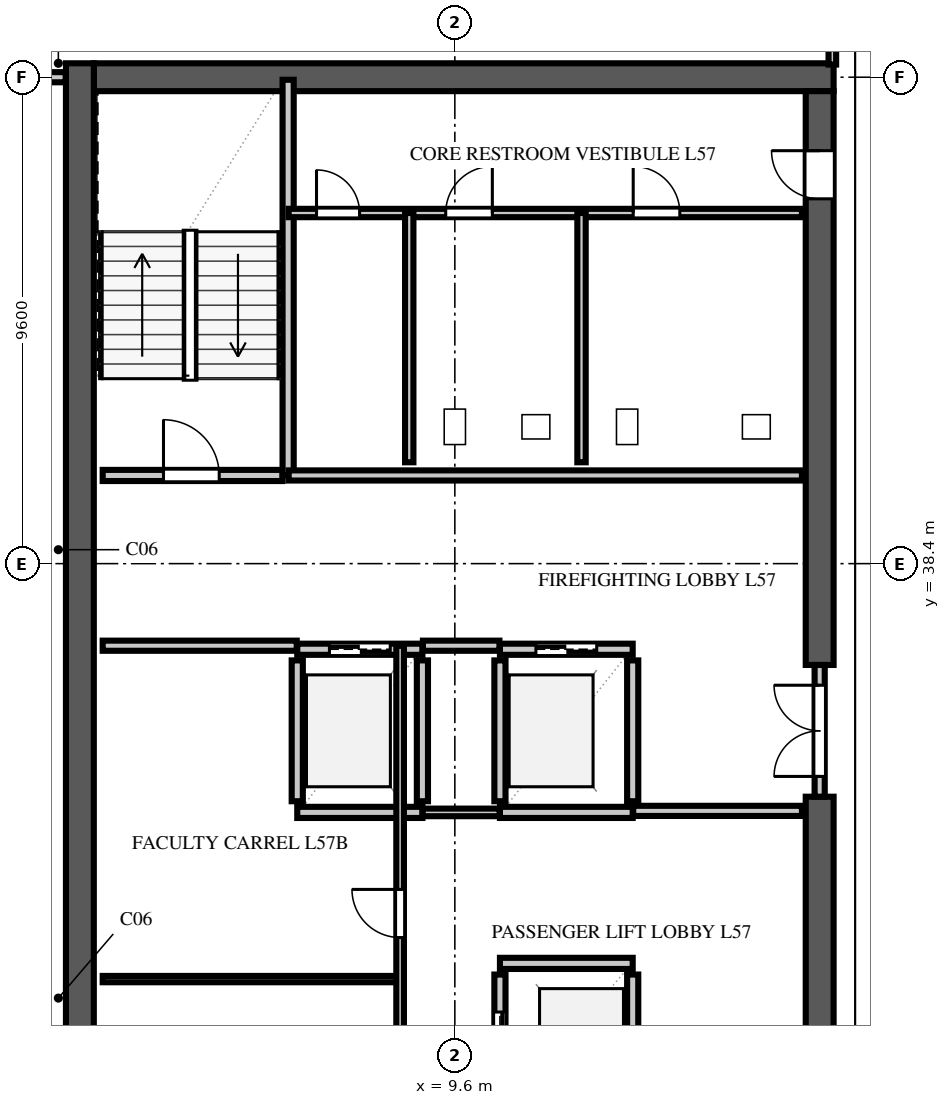
"""IFC4 building model, lengths in metres.
Left out: names, types, materials, properties, quantities, classifications, styles, units other than length and angle.
Written with IfcOpenShell. Run it as: python <this file> out.ifc"""

import sys

from ifc_helpers import new_model, si_unit, direction, frame, frame_2d, origin, place, context, subcontext, project, spatial, rectangle, extrude, element, fill, save


model = new_model("IFC4")
c1 = context("Model", 3, precision=1e-05, world=origin(), true_north=direction((0.0, 1.0)))
c2 = subcontext(c1, "Body", "Model", "MODEL_VIEW")
j1 = project(units=[si_unit("LENGTHUNIT", "METRE"), si_unit("PLANEANGLEUNIT", "RADIAN")], contexts=[c1])
p1 = place(None, origin())
s1 = spatial("IfcSite", under=j1, at=p1, CompositionType="ELEMENT")
p2 = place(p1, origin())
s2 = spatial("IfcBuilding", under=s1, at=p2, CompositionType="ELEMENT")
p3 = place(p2, frame((0.0, 0.0, 225.6)))
s3 = spatial("IfcBuildingStorey", under=s2, at=p3, CompositionType="ELEMENT", Elevation=225.6)
p4 = place(p3, frame((2.475, 48.0, 0.0), z_axis=(0.0, 0.0, 1.0), x_axis=(1.0, 0.0, 0.0)))
e1 = element("IfcWall", 1, at=p4, inside=s3, PredefinedType="SHEAR", context=c2, shape_type="SweptSolid", body=[
    extrude(rectangle(XDim=14.6, YDim=0.55, at=frame_2d((7.3, 0.0))), origin(), (0.0, 0.0, 1.0), 3.54),
])
p5 = place(p3, frame((2.2, 9.325, 0.0), z_axis=(0.0, 0.0, 1.0), x_axis=(0.0, 1.0, 0.0)))
e2 = element("IfcWall", 2, at=p5, inside=s3, PredefinedType="SHEAR", context=c2, shape_type="SweptSolid", body=[
    extrude(rectangle(XDim=38.95, YDim=0.55, at=frame_2d((19.475, 0.0))), origin(), (0.0, 0.0, 1.0), 3.54),
])
p6 = place(p3, frame((16.8, 26.0, 0.0), z_axis=(0.0, 0.0, 1.0), x_axis=(0.0, 1.0, 0.0)))
e3 = element("IfcWall", 3, at=p6, inside=s3, PredefinedType="SHEAR", context=c2, shape_type="SweptSolid", body=[
    extrude(rectangle(XDim=7.8, YDim=0.55, at=frame_2d((3.9, 0.0))), origin(), (0.0, 0.0, 1.0), 3.54),
])
p7 = place(p3, frame((16.8, 36.4, 0.0), z_axis=(0.0, 0.0, 1.0), x_axis=(0.0, 1.0, 0.0)))
e4 = element("IfcWall", 4, at=p7, inside=s3, PredefinedType="SHEAR", context=c2, shape_type="SweptSolid", body=[
    extrude(rectangle(XDim=11.325, YDim=0.55, at=frame_2d((5.663, 0.0))), origin(), (0.0, 0.0, 1.0), 3.54),
])
p8 = place(p7, frame((9.2, 0.0, 0.0)))
e5 = element("IfcOpeningElement", 5, at=p8, cuts=e4, PredefinedType="OPENING", context=c2, shape_type="SweptSolid", body=[
    extrude(rectangle(XDim=0.95, YDim=2.15, at=frame_2d((0.475, 1.075))), frame((0.0, 0.287, 0.0), z_axis=(0.0, -1.0, 0.0), x_axis=(1.0, 0.0, 0.0)), (0.0, 0.0, 1.0), 0.574),
])
p9 = place(p3, frame((2.65, 40.14, 0.0), z_axis=(0.0, 0.0, 1.0), x_axis=(1.0, 0.0, 0.0)))
e6 = element("IfcWall", 6, at=p9, inside=s3, PredefinedType="SOLIDWALL", context=c2, shape_type="SweptSolid", body=[
    extrude(rectangle(XDim=3.55, YDim=0.22, at=frame_2d((1.775, 0.0))), origin(), (0.0, 0.0, 1.0), 3.54),
])
p10 = place(p9, frame((1.2, 0.0, 0.0)))
e7 = element("IfcOpeningElement", 7, at=p10, cuts=e6, PredefinedType="OPENING", context=c2, shape_type="SweptSolid", body=[
    extrude(rectangle(XDim=1.1, YDim=2.2, at=frame_2d((0.55, 1.1))), frame((0.0, 0.122, 0.0), z_axis=(0.0, -1.0, 0.0), x_axis=(1.0, 0.0, 0.0)), (0.0, 0.0, 1.0), 0.244),
])
p11 = place(p3, frame((6.31, 40.14, 0.0), z_axis=(0.0, 0.0, 1.0), x_axis=(0.0, 1.0, 0.0)))
e8 = element("IfcWall", 8, at=p11, inside=s3, PredefinedType="SOLIDWALL", context=c2, shape_type="SweptSolid", body=[
    extrude(rectangle(XDim=7.81, YDim=0.22, at=frame_2d((3.905, 0.0))), origin(), (0.0, 0.0, 1.0), 3.54),
])
p12 = place(p3, frame((10.49, 27.71, 0.0), z_axis=(0.0, 0.0, 1.0), x_axis=(0.0, 1.0, 0.0)))
e9 = element("IfcWall", 9, at=p12, inside=s3, PredefinedType="SOLIDWALL", context=c2, shape_type="SweptSolid", body=[
    extrude(rectangle(XDim=2.58, YDim=0.22, at=frame_2d((1.29, 0.0))), origin(), (0.0, 0.0, 1.0), 3.54),
])
p13 = place(p12, frame((0.74, 0.0, 0.0)))
e10 = element("IfcOpeningElement", 10, at=p13, cuts=e9, PredefinedType="OPENING", context=c2, shape_type="SweptSolid", body=[
    extrude(rectangle(XDim=1.1, YDim=2.2, at=frame_2d((0.55, 1.1))), frame((0.0, 0.122, 0.0), z_axis=(0.0, -1.0, 0.0), x_axis=(1.0, 0.0, 0.0)), (0.0, 0.0, 1.0), 0.244),
])
p14 = place(p3, frame((13.11, 27.71, 0.0), z_axis=(0.0, 0.0, 1.0), x_axis=(0.0, 1.0, 0.0)))
e11 = element("IfcWall", 11, at=p14, inside=s3, PredefinedType="SOLIDWALL", context=c2, shape_type="SweptSolid", body=[
    extrude(rectangle(XDim=2.58, YDim=0.22, at=frame_2d((1.29, 0.0))), origin(), (0.0, 0.0, 1.0), 3.54),
])
p15 = place(p3, frame((10.49, 30.51, 0.0), z_axis=(0.0, 0.0, 1.0), x_axis=(1.0, 0.0, 0.0)))
e12 = element("IfcWall", 12, at=p15, inside=s3, PredefinedType="SOLIDWALL", context=c2, shape_type="SweptSolid", body=[
    extrude(rectangle(XDim=2.62, YDim=0.22, at=frame_2d((1.31, 0.0))), origin(), (0.0, 0.0, 1.0), 3.54),
])
for number, where, z_axis, x_axis in (
    (13, (6.49, 33.71, 0.0), (0.0, 0.0, 1.0), (0.0, 1.0, 0.0)),
    (14, (8.96, 33.71, 0.0), (0.0, 0.0, 1.0), (0.0, 1.0, 0.0)),
):
    element("IfcWall", number, at=place(p3, frame(where, z_axis=z_axis, x_axis=x_axis)), inside=s3, PredefinedType="SOLIDWALL", context=c2, shape_type="SweptSolid", body=[
        extrude(rectangle(XDim=2.78, YDim=0.22, at=frame_2d((1.39, 0.0))), origin(), (0.0, 0.0, 1.0), 3.54),
    ])
p16 = place(p3, frame((6.49, 33.49, 0.0), z_axis=(0.0, 0.0, 1.0), x_axis=(1.0, 0.0, 0.0)))
e15 = element("IfcWall", 15, at=p16, inside=s3, PredefinedType="SOLIDWALL", context=c2, shape_type="SweptSolid", body=[
    extrude(rectangle(XDim=2.47, YDim=0.22, at=frame_2d((1.235, 0.0))), origin(), (0.0, 0.0, 1.0), 3.54),
])
p17 = place(p3, frame((6.49, 36.71, 0.0), z_axis=(0.0, 0.0, 1.0), x_axis=(1.0, 0.0, 0.0)))
e16 = element("IfcWall", 16, at=p17, inside=s3, PredefinedType="SOLIDWALL", context=c2, shape_type="SweptSolid", body=[
    extrude(rectangle(XDim=2.47, YDim=0.22, at=frame_2d((1.235, 0.0))), origin(), (0.0, 0.0, 1.0), 3.54),
])
p18 = place(p17, frame((0.635, 0.0, 0.0)))
e17 = element("IfcOpeningElement", 17, at=p18, cuts=e16, PredefinedType="OPENING", context=c2, shape_type="SweptSolid", body=[
    extrude(rectangle(XDim=1.2, YDim=2.2, at=frame_2d((0.6, 1.1))), frame((0.0, 0.122, 0.0), z_axis=(0.0, -1.0, 0.0), x_axis=(1.0, 0.0, 0.0)), (0.0, 0.0, 1.0), 0.244),
])
for number, where, z_axis, x_axis in (
    (18, (10.49, 33.71, 0.0), (0.0, 0.0, 1.0), (0.0, 1.0, 0.0)),
    (19, (13.11, 33.71, 0.0), (0.0, 0.0, 1.0), (0.0, 1.0, 0.0)),
):
    element("IfcWall", number, at=place(p3, frame(where, z_axis=z_axis, x_axis=x_axis)), inside=s3, PredefinedType="SOLIDWALL", context=c2, shape_type="SweptSolid", body=[
        extrude(rectangle(XDim=2.78, YDim=0.22, at=frame_2d((1.39, 0.0))), origin(), (0.0, 0.0, 1.0), 3.54),
    ])
p19 = place(p3, frame((10.49, 33.49, 0.0), z_axis=(0.0, 0.0, 1.0), x_axis=(1.0, 0.0, 0.0)))
e20 = element("IfcWall", 20, at=p19, inside=s3, PredefinedType="SOLIDWALL", context=c2, shape_type="SweptSolid", body=[
    extrude(rectangle(XDim=2.62, YDim=0.22, at=frame_2d((1.31, 0.0))), origin(), (0.0, 0.0, 1.0), 3.54),
])
p20 = place(p3, frame((10.49, 36.71, 0.0), z_axis=(0.0, 0.0, 1.0), x_axis=(1.0, 0.0, 0.0)))
e21 = element("IfcWall", 21, at=p20, inside=s3, PredefinedType="SOLIDWALL", context=c2, shape_type="SweptSolid", body=[
    extrude(rectangle(XDim=2.62, YDim=0.22, at=frame_2d((1.31, 0.0))), origin(), (0.0, 0.0, 1.0), 3.54),
])
p21 = place(p20, frame((0.71, 0.0, 0.0)))
e22 = element("IfcOpeningElement", 22, at=p21, cuts=e21, PredefinedType="OPENING", context=c2, shape_type="SweptSolid", body=[
    extrude(rectangle(XDim=1.2, YDim=2.2, at=frame_2d((0.6, 1.1))), frame((0.0, 0.122, 0.0), z_axis=(0.0, -1.0, 0.0), x_axis=(1.0, 0.0, 0.0)), (0.0, 0.0, 1.0), 0.244),
])
p22 = place(p3, frame((2.65, 36.78, 0.0), z_axis=(0.0, 0.0, 1.0), x_axis=(1.0, 0.0, 0.0)))
e23 = element("IfcWall", 23, at=p22, inside=s3, PredefinedType="SOLIDWALL", context=c2, shape_type="SweptSolid", body=[
    extrude(rectangle(XDim=3.83, YDim=0.2, at=frame_2d((1.915, 0.0))), origin(), (0.0, 0.0, 1.0), 3.54),
])
p23 = place(p3, frame((8.97, 36.78, 0.0), z_axis=(0.0, 0.0, 1.0), x_axis=(1.0, 0.0, 0.0)))
e24 = element("IfcWall", 24, at=p23, inside=s3, PredefinedType="SOLIDWALL", context=c2, shape_type="SweptSolid", body=[
    extrude(rectangle(XDim=1.51, YDim=0.2, at=frame_2d((0.755, 0.0))), origin(), (0.0, 0.0, 1.0), 3.54),
])
p24 = place(p3, frame((13.12, 33.52, 0.0), z_axis=(0.0, 0.0, 1.0), x_axis=(1.0, 0.0, 0.0)))
e25 = element("IfcWall", 25, at=p24, inside=s3, PredefinedType="SOLIDWALL", context=c2, shape_type="SweptSolid", body=[
    extrude(rectangle(XDim=3.33, YDim=0.2, at=frame_2d((1.665, 0.0))), origin(), (0.0, 0.0, 1.0), 3.54),
])
p25 = place(p3, frame((6.32, 40.14, 0.0), z_axis=(0.0, 0.0, 1.0), x_axis=(1.0, 0.0, 0.0)))
e26 = element("IfcWall", 26, at=p25, inside=s3, PredefinedType="SOLIDWALL", context=c2, shape_type="SweptSolid", body=[
    extrude(rectangle(XDim=10.13, YDim=0.2, at=frame_2d((5.065, 0.0))), origin(), (0.0, 0.0, 1.0), 3.54),
])
p26 = place(p3, frame((16.8, 33.8, 0.0), z_axis=(0.0, 0.0, 1.0), x_axis=(0.0, 1.0, 0.0)))
e27 = element("IfcWall", 27, at=p26, inside=s3, PredefinedType="SOLIDWALL", context=c2, shape_type="SweptSolid", body=[
    extrude(rectangle(XDim=2.6, YDim=0.2, at=frame_2d((1.3, 0.0))), origin(), (0.0, 0.0, 1.0), 3.54),
])
p27 = place(p26, frame((0.4, 0.0, 0.0)))
e28 = element("IfcOpeningElement", 28, at=p27, cuts=e27, PredefinedType="OPENING", context=c2, shape_type="SweptSolid", body=[
    extrude(rectangle(XDim=1.8, YDim=2.2, at=frame_2d((0.9, 1.1))), frame((0.0, 0.112, 0.0), z_axis=(0.0, -1.0, 0.0), x_axis=(1.0, 0.0, 0.0)), (0.0, 0.0, 1.0), 0.224),
])
p28 = place(p3, frame((8.965, 33.49, 0.0), z_axis=(0.0, 0.0, 1.0), x_axis=(1.0, 0.0, 0.0)))
e29 = element("IfcWall", 29, at=p28, inside=s3, PredefinedType="PARTITIONING", context=c2, shape_type="SweptSolid", body=[
    extrude(rectangle(XDim=1.52, YDim=0.15, at=frame_2d((0.76, 0.0))), origin(), (0.0, 0.0, 1.0), 3.54),
])
p29 = place(p3, frame((2.65, 30.2, 0.0), z_axis=(0.0, 0.0, 1.0), x_axis=(1.0, 0.0, 0.0)))
e30 = element("IfcWall", 30, at=p29, inside=s3, PredefinedType="PARTITIONING", context=c2, shape_type="SweptSolid", body=[
    extrude(rectangle(XDim=5.87, YDim=0.125, at=frame_2d((2.935, 0.0))), origin(), (0.0, 0.0, 1.0), 3.54),
])
p30 = place(p3, frame((8.52, 12.02, 0.0), z_axis=(0.0, 0.0, 1.0), x_axis=(0.0, 1.0, 0.0)))
e31 = element("IfcWall", 31, at=p30, inside=s3, PredefinedType="PARTITIONING", context=c2, shape_type="SweptSolid", body=[
    extrude(rectangle(XDim=24.76, YDim=0.15, at=frame_2d((12.38, 0.0))), origin(), (0.0, 0.0, 1.0), 3.54),
])
p31 = place(p30, frame((8.0, 0.0, 0.0)))
e32 = element("IfcOpeningElement", 32, at=p31, cuts=e31, PredefinedType="OPENING", context=c2, shape_type="SweptSolid", body=[
    extrude(rectangle(XDim=0.95, YDim=2.15, at=frame_2d((0.475, 1.075))), frame((0.0, 0.087, 0.0), z_axis=(0.0, -1.0, 0.0), x_axis=(1.0, 0.0, 0.0)), (0.0, 0.0, 1.0), 0.174),
])
p32 = place(p30, frame((19.0, 0.0, 0.0)))
e33 = element("IfcOpeningElement", 33, at=p32, cuts=e31, PredefinedType="OPENING", context=c2, shape_type="SweptSolid", body=[
    extrude(rectangle(XDim=0.95, YDim=2.15, at=frame_2d((0.475, 1.075))), frame((0.0, 0.087, 0.0), z_axis=(0.0, -1.0, 0.0), x_axis=(1.0, 0.0, 0.0)), (0.0, 0.0, 1.0), 0.174),
])
p33 = place(p3, frame((6.32, 45.32, 0.0), z_axis=(0.0, 0.0, 1.0), x_axis=(1.0, 0.0, 0.0)))
e34 = element("IfcWall", 34, at=p33, inside=s3, PredefinedType="PLUMBINGWALL", context=c2, shape_type="SweptSolid", body=[
    extrude(rectangle(XDim=10.13, YDim=0.165, at=frame_2d((5.065, 0.0))), origin(), (0.0, 0.0, 1.0), 3.54),
])
p34 = place(p33, frame((0.55, 0.0, 0.0)))
e35 = element("IfcOpeningElement", 35, at=p34, cuts=e34, PredefinedType="OPENING", context=c2, shape_type="SweptSolid", body=[
    extrude(rectangle(XDim=0.85, YDim=2.1, at=frame_2d((0.425, 1.05))), frame((0.0, 0.094, 0.0), z_axis=(0.0, -1.0, 0.0), x_axis=(1.0, 0.0, 0.0)), (0.0, 0.0, 1.0), 0.189),
])
p35 = place(p33, frame((3.1, 0.0, 0.0)))
e36 = element("IfcOpeningElement", 36, at=p35, cuts=e34, PredefinedType="OPENING", context=c2, shape_type="SweptSolid", body=[
    extrude(rectangle(XDim=0.92, YDim=2.15, at=frame_2d((0.46, 1.075))), frame((0.0, 0.094, 0.0), z_axis=(0.0, -1.0, 0.0), x_axis=(1.0, 0.0, 0.0)), (0.0, 0.0, 1.0), 0.189),
])
p36 = place(p33, frame((6.8, 0.0, 0.0)))
e37 = element("IfcOpeningElement", 37, at=p36, cuts=e34, PredefinedType="OPENING", context=c2, shape_type="SweptSolid", body=[
    extrude(rectangle(XDim=0.92, YDim=2.15, at=frame_2d((0.46, 1.075))), frame((0.0, 0.094, 0.0), z_axis=(0.0, -1.0, 0.0), x_axis=(1.0, 0.0, 0.0)), (0.0, 0.0, 1.0), 0.189),
])
for number, where, z_axis, x_axis in (
    (38, (8.7, 40.4, 0.0), (0.0, 0.0, 1.0), (0.0, 1.0, 0.0)),
    (39, (12.1, 40.4, 0.0), (0.0, 0.0, 1.0), (0.0, 1.0, 0.0)),
):
    element("IfcWall", number, at=place(p3, frame(where, z_axis=z_axis, x_axis=x_axis)), inside=s3, PredefinedType="PLUMBINGWALL", context=c2, shape_type="SweptSolid", body=[
        extrude(rectangle(XDim=4.92, YDim=0.165, at=frame_2d((2.46, 0.0))), origin(), (0.0, 0.0, 1.0), 3.54),
    ])
p37 = place(p3, frame((0.85, 48.0, 0.0), z_axis=(0.0, 0.0, 1.0), x_axis=(1.0, 0.0, 0.0)))
e40 = element("IfcWall", 40, at=p37, inside=s3, PredefinedType="SOLIDWALL", context=c2, shape_type="SweptSolid", body=[
    extrude(rectangle(XDim=1.07, YDim=0.2, at=frame_2d((0.535, 0.0))), origin(), (0.0, 0.0, 1.0), 3.54),
])
p38 = place(p3, frame((17.05, 48.25, 0.0), z_axis=(0.0, 0.0, 1.0), x_axis=(0.0, 1.0, 0.0)))
e41 = element("IfcWall", 41, at=p38, inside=s3, PredefinedType="PARTITIONING", context=c2, shape_type="SweptSolid", body=[
    extrude(rectangle(XDim=9.13, YDim=0.15, at=frame_2d((4.565, 0.0))), origin(), (0.0, 0.0, 1.0), 3.54),
])
p39 = place(p38, frame((2.9, 0.0, 0.0)))
e42 = element("IfcOpeningElement", 42, at=p39, cuts=e41, PredefinedType="OPENING", context=c2, shape_type="SweptSolid", body=[
    extrude(rectangle(XDim=0.95, YDim=2.15, at=frame_2d((0.475, 1.075))), frame((0.0, 0.087, 0.0), z_axis=(0.0, -1.0, 0.0), x_axis=(1.0, 0.0, 0.0)), (0.0, 0.0, 1.0), 0.174),
])
p40 = place(p10, origin())
e43 = element("IfcDoor", 43, at=p40, inside=s3, OperationType="SINGLE_SWING_LEFT", PredefinedType="DOOR", context=c2, shape_type="SweptSolid", body=[
    extrude(rectangle(XDim=1.1, YDim=2.2, at=frame_2d((0.55, 1.1))), frame((0.0, 0.025, 0.0), z_axis=(0.0, -1.0, 0.0), x_axis=(1.0, 0.0, 0.0)), (0.0, 0.0, 1.0), 0.05),
])
fill(e7, e43)
p41 = place(p13, origin())
e44 = element("IfcDoor", 44, at=p41, inside=s3, OperationType="DOUBLE_DOOR_SLIDING", PredefinedType="DOOR", context=c2, shape_type="SweptSolid", body=[
    extrude(rectangle(XDim=1.1, YDim=2.2, at=frame_2d((0.55, 1.1))), frame((0.0, 0.025, 0.0), z_axis=(0.0, -1.0, 0.0), x_axis=(1.0, 0.0, 0.0)), (0.0, 0.0, 1.0), 0.05),
])
fill(e10, e44)
p42 = place(p18, origin())
e45 = element("IfcDoor", 45, at=p42, inside=s3, OperationType="DOUBLE_DOOR_SLIDING", PredefinedType="DOOR", context=c2, shape_type="SweptSolid", body=[
    extrude(rectangle(XDim=1.2, YDim=2.2, at=frame_2d((0.6, 1.1))), frame((0.0, 0.025, 0.0), z_axis=(0.0, -1.0, 0.0), x_axis=(1.0, 0.0, 0.0)), (0.0, 0.0, 1.0), 0.05),
])
fill(e17, e45)
p43 = place(p21, origin())
e46 = element("IfcDoor", 46, at=p43, inside=s3, OperationType="DOUBLE_DOOR_SLIDING", PredefinedType="DOOR", context=c2, shape_type="SweptSolid", body=[
    extrude(rectangle(XDim=1.2, YDim=2.2, at=frame_2d((0.6, 1.1))), frame((0.0, 0.025, 0.0), z_axis=(0.0, -1.0, 0.0), x_axis=(1.0, 0.0, 0.0)), (0.0, 0.0, 1.0), 0.05),
])
fill(e22, e46)
p44 = place(p8, origin())
e47 = element("IfcDoor", 47, at=p44, inside=s3, OperationType="SINGLE_SWING_RIGHT", PredefinedType="DOOR", context=c2, shape_type="SweptSolid", body=[
    extrude(rectangle(XDim=0.95, YDim=2.15, at=frame_2d((0.475, 1.075))), frame((0.0, 0.025, 0.0), z_axis=(0.0, -1.0, 0.0), x_axis=(1.0, 0.0, 0.0)), (0.0, 0.0, 1.0), 0.05),
])
fill(e5, e47)
p45 = place(p27, origin())
e48 = element("IfcDoor", 48, at=p45, inside=s3, OperationType="DOUBLE_DOOR_SINGLE_SWING", PredefinedType="DOOR", context=c2, shape_type="SweptSolid", body=[
    extrude(rectangle(XDim=1.8, YDim=2.2, at=frame_2d((0.9, 1.1))), frame((0.0, 0.025, 0.0), z_axis=(0.0, -1.0, 0.0), x_axis=(1.0, 0.0, 0.0)), (0.0, 0.0, 1.0), 0.05),
])
fill(e28, e48)
p46 = place(p32, origin())
e49 = element("IfcDoor", 49, at=p46, inside=s3, OperationType="SINGLE_SWING_RIGHT", PredefinedType="DOOR", context=c2, shape_type="SweptSolid", body=[
    extrude(rectangle(XDim=0.95, YDim=2.15, at=frame_2d((0.475, 1.075))), frame((0.0, 0.025, 0.0), z_axis=(0.0, -1.0, 0.0), x_axis=(1.0, 0.0, 0.0)), (0.0, 0.0, 1.0), 0.05),
])
fill(e33, e49)
p47 = place(p34, origin())
e50 = element("IfcDoor", 50, at=p47, inside=s3, OperationType="SINGLE_SWING_LEFT", PredefinedType="DOOR", context=c2, shape_type="SweptSolid", body=[
    extrude(rectangle(XDim=0.85, YDim=2.1, at=frame_2d((0.425, 1.05))), frame((0.0, 0.025, 0.0), z_axis=(0.0, -1.0, 0.0), x_axis=(1.0, 0.0, 0.0)), (0.0, 0.0, 1.0), 0.05),
])
fill(e35, e50)
p48 = place(p35, origin())
e51 = element("IfcDoor", 51, at=p48, inside=s3, OperationType="SINGLE_SWING_RIGHT", PredefinedType="DOOR", context=c2, shape_type="SweptSolid", body=[
    extrude(rectangle(XDim=0.92, YDim=2.15, at=frame_2d((0.46, 1.075))), frame((0.0, 0.025, 0.0), z_axis=(0.0, -1.0, 0.0), x_axis=(1.0, 0.0, 0.0)), (0.0, 0.0, 1.0), 0.05),
])
fill(e36, e51)
p49 = place(p36, origin())
e52 = element("IfcDoor", 52, at=p49, inside=s3, OperationType="SINGLE_SWING_LEFT", PredefinedType="DOOR", context=c2, shape_type="SweptSolid", body=[
    extrude(rectangle(XDim=0.92, YDim=2.15, at=frame_2d((0.46, 1.075))), frame((0.0, 0.025, 0.0), z_axis=(0.0, -1.0, 0.0), x_axis=(1.0, 0.0, 0.0)), (0.0, 0.0, 1.0), 0.05),
])
fill(e37, e52)
save(model, sys.argv[1])
